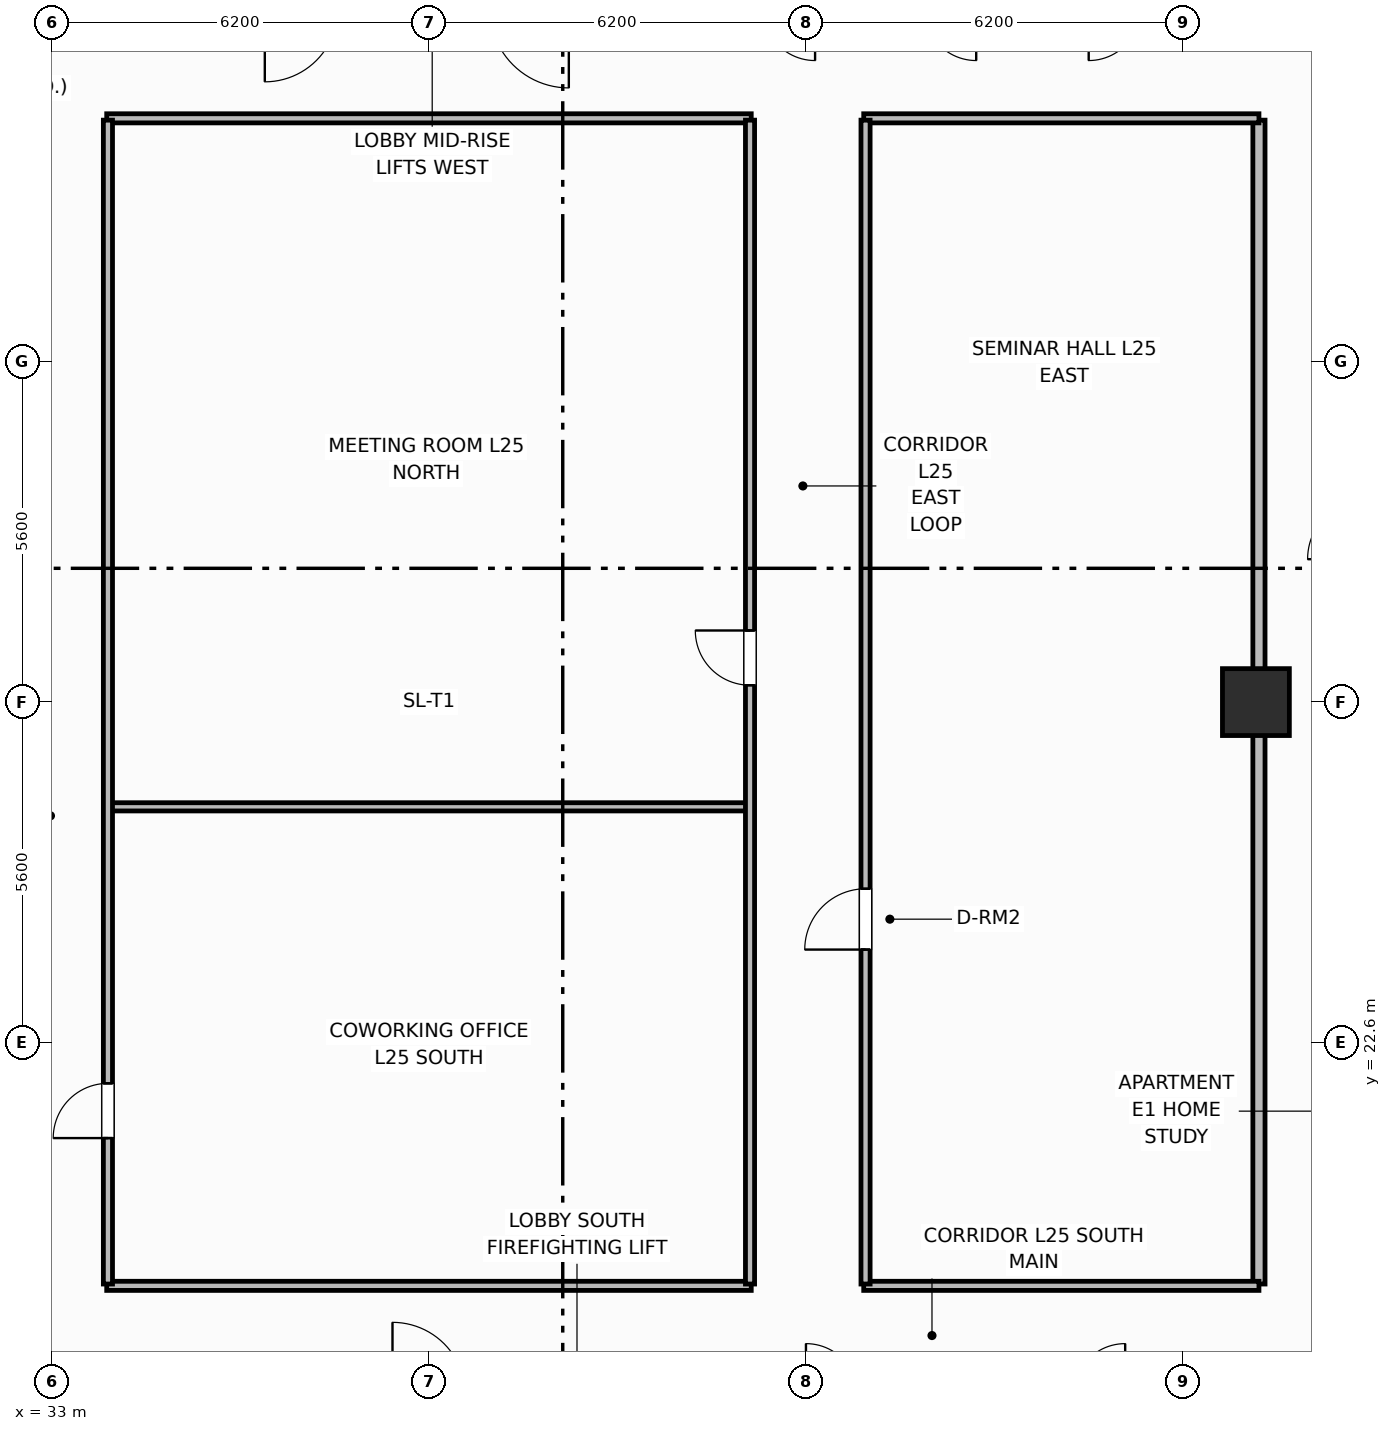
"""IFC4 building model, lengths in metres.
Left out: names, types, materials, properties, quantities, classifications, styles, units other than length and angle.
Written with IfcOpenShell. Run it as: python <this file> out.ifc"""

import sys

from ifc_helpers import new_model, si_unit, direction, frame, frame_2d, origin, origin_2d, place, context, subcontext, project, spatial, rectangle, extrude, element, fill, save


model = new_model("IFC4")
c1 = context("Model", 3, precision=1e-05, world=origin(), true_north=direction((0.0, 1.0)))
c2 = subcontext(c1, "Body", "Model", "MODEL_VIEW")
j1 = project(units=[si_unit("LENGTHUNIT", "METRE"), si_unit("PLANEANGLEUNIT", "RADIAN")], contexts=[c1])
p1 = place(None, origin())
s1 = spatial("IfcSite", under=j1, at=p1, CompositionType="ELEMENT")
p2 = place(p1, origin())
s2 = spatial("IfcBuilding", under=s1, at=p2, CompositionType="ELEMENT")
p3 = place(p2, frame((0.0, 0.0, 103.1)))
s3 = spatial("IfcBuildingStorey", under=s2, at=p3, CompositionType="ELEMENT", Elevation=103.1)
p4 = place(p3, frame((52.8, 28.2, 0.0), z_axis=(0.0, 0.0, 1.0), x_axis=(1.0, 0.0, 0.0)))
e1 = element("IfcColumn", 1, at=p4, inside=s3, PredefinedType="COLUMN", context=c2, shape_type="SweptSolid", body=[
    extrude(rectangle(XDim=1.1, YDim=1.1, at=origin_2d()), origin(), (0.0, 0.0, 1.0), 3.7),
])
p5 = place(p3, frame((52.85, 18.63, 0.0), z_axis=(0.0, 0.0, 1.0), x_axis=(0.0, 1.0, 0.0)))
e2 = element("IfcWall", 2, at=p5, inside=s3, PredefinedType="PARTITIONING", context=c2, shape_type="SweptSolid", body=[
    extrude(rectangle(XDim=19.14, YDim=0.2, at=frame_2d((9.57, 0.0))), origin(), (0.0, 0.0, 1.0), 2.53),
])
for number, where, z_axis, x_axis in (
    (3, (33.9, 18.6, 0.0), (0.0, 0.0, 1.0), (1.0, 0.0, 0.0)),
    (4, (33.9, 37.8, 0.0), (0.0, 0.0, 1.0), (1.0, 0.0, 0.0)),
):
    element("IfcWall", number, at=place(p3, frame(where, z_axis=z_axis, x_axis=x_axis)), inside=s3, PredefinedType="PARTITIONING", context=c2, shape_type="SweptSolid", body=[
        extrude(rectangle(XDim=10.6, YDim=0.15, at=frame_2d((5.3, 0.0))), origin(), (0.0, 0.0, 1.0), 2.53),
    ])
for number, where, z_axis, x_axis in (
    (5, (46.35, 18.6, 0.0), (0.0, 0.0, 1.0), (1.0, 0.0, 0.0)),
    (6, (46.35, 37.8, 0.0), (0.0, 0.0, 1.0), (1.0, 0.0, 0.0)),
):
    element("IfcWall", number, at=place(p3, frame(where, z_axis=z_axis, x_axis=x_axis)), inside=s3, PredefinedType="PARTITIONING", context=c2, shape_type="SweptSolid", body=[
        extrude(rectangle(XDim=6.5, YDim=0.15, at=frame_2d((3.25, 0.0))), origin(), (0.0, 0.0, 1.0), 2.53),
    ])
p6 = place(p3, frame((33.92, 26.477, 0.0), z_axis=(0.0, 0.0, 1.0), x_axis=(1.0, 0.0, 0.0)))
e7 = element("IfcWall", 7, at=p6, inside=s3, PredefinedType="PARTITIONING", context=c2, shape_type="SweptSolid", body=[
    extrude(rectangle(XDim=10.56, YDim=0.135, at=frame_2d((5.28, 0.0))), origin(), (0.0, 0.0, 1.0), 2.53),
])
p7 = place(p3, frame((33.92, 18.63, 0.0), z_axis=(0.0, 0.0, 1.0), x_axis=(0.0, 1.0, 0.0)))
e8 = element("IfcWall", 8, at=p7, inside=s3, PredefinedType="PARTITIONING", context=c2, shape_type="SweptSolid", body=[
    extrude(rectangle(XDim=19.14, YDim=0.15, at=frame_2d((9.57, 0.0))), origin(), (0.0, 0.0, 1.0), 2.53),
])
p8 = place(p7, frame((2.4, 0.0, 0.0)))
e9 = element("IfcOpeningElement", 9, at=p8, cuts=e8, PredefinedType="OPENING", context=c2, shape_type="SweptSolid", body=[
    extrude(rectangle(XDim=0.9, YDim=2.1, at=frame_2d((0.45, 1.05))), frame((0.0, 0.085, 0.0), z_axis=(0.0, -1.0, 0.0), x_axis=(1.0, 0.0, 0.0)), (0.0, 0.0, 1.0), 0.17),
])
p9 = place(p3, frame((44.48, 18.63, 0.0), z_axis=(0.0, 0.0, 1.0), x_axis=(0.0, 1.0, 0.0)))
e10 = element("IfcWall", 10, at=p9, inside=s3, PredefinedType="PARTITIONING", context=c2, shape_type="SweptSolid", body=[
    extrude(rectangle(XDim=19.14, YDim=0.15, at=frame_2d((9.57, 0.0))), origin(), (0.0, 0.0, 1.0), 2.53),
])
p10 = place(p9, frame((9.847, 0.0, 0.0)))
e11 = element("IfcOpeningElement", 11, at=p10, cuts=e10, PredefinedType="OPENING", context=c2, shape_type="SweptSolid", body=[
    extrude(rectangle(XDim=0.9, YDim=2.1, at=frame_2d((0.45, 1.05))), frame((0.0, 0.085, 0.0), z_axis=(0.0, -1.0, 0.0), x_axis=(1.0, 0.0, 0.0)), (0.0, 0.0, 1.0), 0.17),
])
p11 = place(p3, frame((46.38, 18.63, 0.0), z_axis=(0.0, 0.0, 1.0), x_axis=(0.0, 1.0, 0.0)))
e12 = element("IfcWall", 12, at=p11, inside=s3, PredefinedType="PARTITIONING", context=c2, shape_type="SweptSolid", body=[
    extrude(rectangle(XDim=19.14, YDim=0.15, at=frame_2d((9.57, 0.0))), origin(), (0.0, 0.0, 1.0), 2.53),
])
p12 = place(p11, frame((5.5, 0.0, 0.0)))
e13 = element("IfcOpeningElement", 13, at=p12, cuts=e12, PredefinedType="OPENING", context=c2, shape_type="SweptSolid", body=[
    extrude(rectangle(XDim=1.0, YDim=2.15, at=frame_2d((0.5, 1.075))), frame((0.0, 0.085, 0.0), z_axis=(0.0, -1.0, 0.0), x_axis=(1.0, 0.0, 0.0)), (0.0, 0.0, 1.0), 0.17),
])
p13 = place(p8, origin())
e14 = element("IfcDoor", 14, at=p13, inside=s3, OperationType="SINGLE_SWING_LEFT", PredefinedType="DOOR", context=c2, shape_type="SweptSolid", body=[
    extrude(rectangle(XDim=0.9, YDim=2.1, at=frame_2d((0.45, 1.05))), frame((0.0, 0.025, 0.0), z_axis=(0.0, -1.0, 0.0), x_axis=(1.0, 0.0, 0.0)), (0.0, 0.0, 1.0), 0.05),
])
fill(e9, e14)
p14 = place(p10, origin())
e15 = element("IfcDoor", 15, at=p14, inside=s3, OperationType="SINGLE_SWING_RIGHT", PredefinedType="DOOR", context=c2, shape_type="SweptSolid", body=[
    extrude(rectangle(XDim=0.9, YDim=2.1, at=frame_2d((0.45, 1.05))), frame((0.0, 0.025, 0.0), z_axis=(0.0, -1.0, 0.0), x_axis=(1.0, 0.0, 0.0)), (0.0, 0.0, 1.0), 0.05),
])
fill(e11, e15)
p15 = place(p12, origin())
e16 = element("IfcDoor", 16, at=p15, inside=s3, OperationType="SINGLE_SWING_LEFT", PredefinedType="DOOR", context=c2, shape_type="SweptSolid", body=[
    extrude(rectangle(XDim=1.0, YDim=2.15, at=frame_2d((0.5, 1.075))), frame((0.0, 0.025, 0.0), z_axis=(0.0, -1.0, 0.0), x_axis=(1.0, 0.0, 0.0)), (0.0, 0.0, 1.0), 0.05),
])
fill(e13, e16)
save(model, sys.argv[1])
